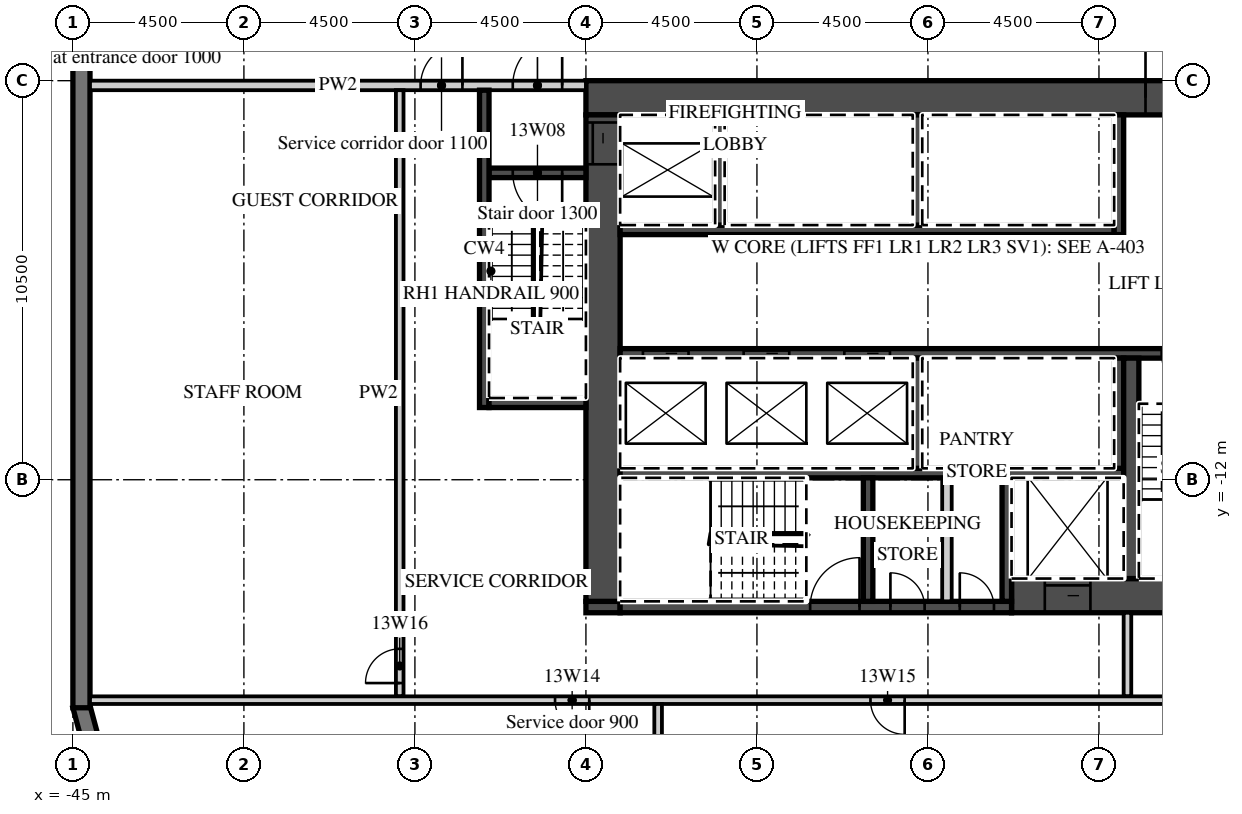
"""IFC4 building model, lengths in metres.
Left out: names, types, materials, properties, quantities, classifications, styles, units other than length and angle.
Written with IfcOpenShell. Run it as: python <this file> out.ifc"""

import sys

from ifc_helpers import new_model, si_unit, direction, frame, frame_2d, origin, place, context, subcontext, project, spatial, polyline, rectangle, outline, extrude, element, fill, save


model = new_model("IFC4")
c1 = context("Model", 3, precision=1e-05, world=origin(), true_north=direction((0.0, 1.0)))
c2 = subcontext(c1, "Body", "Model", "MODEL_VIEW")
j1 = project(units=[si_unit("LENGTHUNIT", "METRE"), si_unit("PLANEANGLEUNIT", "RADIAN")], contexts=[c1])
p1 = place(None, origin())
s1 = spatial("IfcSite", under=j1, at=p1, CompositionType="ELEMENT")
p2 = place(p1, origin())
s2 = spatial("IfcBuilding", under=s1, at=p2, CompositionType="ELEMENT")
p3 = place(p2, frame((0.0, 0.0, 73.2)))
s3 = spatial("IfcBuildingStorey", under=s2, at=p3, CompositionType="ELEMENT", Elevation=73.2)
p4 = place(p3, frame((-44.783, -17.942, 0.0), z_axis=(0.0, 0.0, 1.0), x_axis=(0.25881466832, -0.965926999034, 0.0)))
e1 = element("IfcWall", 1, at=p4, inside=s3, PredefinedType="SOLIDWALL", context=c2, shape_type="SweptSolid", body=[
    extrude(outline(polyline([(0.0, -0.225), (2.071, -0.225), (1.95, 0.225), (0.121, 0.225), (0.0, -0.225)])), origin(), (0.0, 0.0, 1.0), 3.02),
])
p5 = place(p3, frame((-44.775, 18.0, 0.0), z_axis=(0.0, 0.0, 1.0), x_axis=(0.0, -1.0, 0.0)))
e2 = element("IfcWall", 2, at=p5, inside=s3, PredefinedType="SOLIDWALL", context=c2, shape_type="SweptSolid", body=[
    extrude(rectangle(XDim=36.0, YDim=0.45, at=frame_2d((18.0, 0.0))), origin(), (0.0, 0.0, 1.0), 3.02),
])
p6 = place(p5, frame((3.9, 0.0, 0.45)))
e3 = element("IfcOpeningElement", 3, at=p6, cuts=e2, PredefinedType="OPENING", context=c2, shape_type="SweptSolid", body=[
    extrude(rectangle(XDim=3.3, YDim=2.25, at=frame_2d((1.65, 1.125))), frame((0.0, 0.235, 0.0), z_axis=(0.0, -1.0, 0.0), x_axis=(1.0, 0.0, 0.0)), (0.0, 0.0, 1.0), 0.47),
])
p7 = place(p5, frame((8.4, 0.0, 0.45)))
e4 = element("IfcOpeningElement", 4, at=p7, cuts=e2, PredefinedType="OPENING", context=c2, shape_type="SweptSolid", body=[
    extrude(rectangle(XDim=3.3, YDim=2.25, at=frame_2d((1.65, 1.125))), frame((0.0, 0.235, 0.0), z_axis=(0.0, -1.0, 0.0), x_axis=(1.0, 0.0, 0.0)), (0.0, 0.0, 1.0), 0.47),
])
p8 = place(p5, frame((12.9, 0.0, 0.45)))
e5 = element("IfcOpeningElement", 5, at=p8, cuts=e2, PredefinedType="OPENING", context=c2, shape_type="SweptSolid", body=[
    extrude(rectangle(XDim=3.3, YDim=2.25, at=frame_2d((1.65, 1.125))), frame((0.0, 0.235, 0.0), z_axis=(0.0, -1.0, 0.0), x_axis=(1.0, 0.0, 0.0)), (0.0, 0.0, 1.0), 0.47),
])
p9 = place(p3, frame((-31.5, -1.95, 0.0), z_axis=(0.0, 0.0, 1.0), x_axis=(1.0, 0.0, 0.0)))
e6 = element("IfcWall", 6, at=p9, inside=s3, PredefinedType="SHEAR", context=c2, shape_type="SweptSolid", body=[
    extrude(rectangle(XDim=18.0, YDim=0.9, at=frame_2d((9.0, 0.0))), origin(), (0.0, 0.0, 1.0), 3.02),
])
p10 = place(p9, frame((14.725, 0.0, 0.0)))
e7 = element("IfcOpeningElement", 7, at=p10, cuts=e6, PredefinedType="OPENING", context=c2, shape_type="SweptSolid", body=[
    extrude(rectangle(XDim=1.8, YDim=2.1, at=frame_2d((0.9, 1.05))), frame((0.0, 0.46, 0.0), z_axis=(0.0, -1.0, 0.0), x_axis=(1.0, 0.0, 0.0)), (0.0, 0.0, 1.0), 0.92),
])
p11 = place(p3, frame((-20.3, -15.05, 0.0), z_axis=(0.0, 0.0, 1.0), x_axis=(1.0, 0.0, 0.0)))
e8 = element("IfcWall", 8, at=p11, inside=s3, PredefinedType="SHEAR", context=c2, shape_type="SweptSolid", body=[
    extrude(rectangle(XDim=6.8, YDim=0.9, at=frame_2d((3.4, 0.0))), origin(), (0.0, 0.0, 1.0), 3.02),
])
p12 = place(p11, frame((0.875, 0.0, 0.0)))
e9 = element("IfcOpeningElement", 9, at=p12, cuts=e8, PredefinedType="OPENING", context=c2, shape_type="SweptSolid", body=[
    extrude(rectangle(XDim=1.2, YDim=2.1, at=frame_2d((0.6, 1.05))), frame((0.0, 0.46, 0.0), z_axis=(0.0, -1.0, 0.0), x_axis=(1.0, 0.0, 0.0)), (0.0, 0.0, 1.0), 0.92),
])
p13 = place(p3, frame((-31.5, -15.35, 0.0), z_axis=(0.0, 0.0, 1.0), x_axis=(1.0, 0.0, 0.0)))
e10 = element("IfcWall", 10, at=p13, inside=s3, PredefinedType="SHEAR", context=c2, shape_type="SweptSolid", body=[
    extrude(rectangle(XDim=0.9, YDim=0.3, at=frame_2d((0.45, 0.0))), origin(), (0.0, 0.0, 1.0), 3.02),
])
p14 = place(p3, frame((-30.6, -15.35, 0.0), z_axis=(0.0, 0.0, 1.0), x_axis=(1.0, 0.0, 0.0)))
e11 = element("IfcWall", 11, at=p14, inside=s3, PredefinedType="SHEAR", context=c2, shape_type="SweptSolid", body=[
    extrude(rectangle(XDim=10.3, YDim=0.3, at=frame_2d((5.15, 0.0))), origin(), (0.0, 0.0, 1.0), 3.02),
])
p15 = place(p14, frame((5.0, 0.0, 0.0)))
e12 = element("IfcOpeningElement", 12, at=p15, cuts=e11, PredefinedType="OPENING", context=c2, shape_type="SweptSolid", body=[
    extrude(rectangle(XDim=1.3, YDim=2.1, at=frame_2d((0.65, 1.05))), frame((0.0, 0.16, 0.0), z_axis=(0.0, -1.0, 0.0), x_axis=(1.0, 0.0, 0.0)), (0.0, 0.0, 1.0), 0.32),
])
p16 = place(p14, frame((7.113, 0.0, 0.0)))
e13 = element("IfcOpeningElement", 13, at=p16, cuts=e11, PredefinedType="OPENING", context=c2, shape_type="SweptSolid", body=[
    extrude(rectangle(XDim=0.9, YDim=2.1, at=frame_2d((0.45, 1.05))), frame((0.0, 0.16, 0.0), z_axis=(0.0, -1.0, 0.0), x_axis=(1.0, 0.0, 0.0)), (0.0, 0.0, 1.0), 0.32),
])
p17 = place(p14, frame((8.938, 0.0, 0.0)))
e14 = element("IfcOpeningElement", 14, at=p17, cuts=e11, PredefinedType="OPENING", context=c2, shape_type="SweptSolid", body=[
    extrude(rectangle(XDim=0.9, YDim=2.1, at=frame_2d((0.45, 1.05))), frame((0.0, 0.16, 0.0), z_axis=(0.0, -1.0, 0.0), x_axis=(1.0, 0.0, 0.0)), (0.0, 0.0, 1.0), 0.32),
])
p18 = place(p3, frame((-31.05, -15.2, 0.0), z_axis=(0.0, 0.0, 1.0), x_axis=(0.0, 1.0, 0.0)))
e15 = element("IfcWall", 15, at=p18, inside=s3, PredefinedType="SHEAR", context=c2, shape_type="SweptSolid", body=[
    extrude(rectangle(XDim=12.8, YDim=0.9, at=frame_2d((6.4, 0.0))), origin(), (0.0, 0.0, 1.0), 3.02),
])
p19 = place(p18, frame((11.5, 0.0, 0.0)))
e16 = element("IfcOpeningElement", 16, at=p19, cuts=e15, PredefinedType="OPENING", context=c2, shape_type="SweptSolid", body=[
    extrude(rectangle(XDim=1.1, YDim=2.1, at=frame_2d((0.55, 1.05))), frame((0.0, 0.46, 0.0), z_axis=(0.0, -1.0, 0.0), x_axis=(1.0, 0.0, 0.0)), (0.0, 0.0, 1.0), 0.92),
])
p20 = place(p3, frame((-30.6, -5.425, 0.0), z_axis=(0.0, 0.0, 1.0), x_axis=(1.0, 0.0, 0.0)))
e17 = element("IfcWall", 17, at=p20, inside=s3, PredefinedType="SHEAR", context=c2, shape_type="SweptSolid", body=[
    extrude(rectangle(XDim=13.0, YDim=0.25, at=frame_2d((6.5, 0.0))), origin(), (0.0, 0.0, 1.0), 3.02),
])
p21 = place(p3, frame((-17.475, -5.55, 0.0), z_axis=(0.0, 0.0, 1.0), x_axis=(0.0, 1.0, 0.0)))
e18 = element("IfcWall", 18, at=p21, inside=s3, PredefinedType="SHEAR", context=c2, shape_type="SweptSolid", body=[
    extrude(rectangle(XDim=3.15, YDim=0.25, at=frame_2d((1.575, 0.0))), origin(), (0.0, 0.0, 1.0), 3.02),
])
for number, where, z_axis, x_axis in (
    (19, (-27.975, -5.3, 0.0), (0.0, 0.0, 1.0), (0.0, 1.0, 0.0)),
    (20, (-22.775, -5.3, 0.0), (0.0, 0.0, 1.0), (0.0, 1.0, 0.0)),
):
    element("IfcWall", number, at=place(p3, frame(where, z_axis=z_axis, x_axis=x_axis)), inside=s3, PredefinedType="SHEAR", context=c2, shape_type="SweptSolid", body=[
        extrude(rectangle(XDim=2.9, YDim=0.25, at=frame_2d((1.45, 0.0))), origin(), (0.0, 0.0, 1.0), 3.02),
    ])
p22 = place(p3, frame((-30.6, -8.675, 0.0), z_axis=(0.0, 0.0, 1.0), x_axis=(1.0, 0.0, 0.0)))
e21 = element("IfcWall", 21, at=p22, inside=s3, PredefinedType="SHEAR", context=c2, shape_type="SweptSolid", body=[
    extrude(rectangle(XDim=16.2, YDim=0.25, at=frame_2d((8.1, 0.0))), origin(), (0.0, 0.0, 1.0), 3.02),
])
p23 = place(p22, frame((0.6, 0.0, 0.0)))
e22 = element("IfcOpeningElement", 22, at=p23, cuts=e21, PredefinedType="OPENING", context=c2, shape_type="SweptSolid", body=[
    extrude(rectangle(XDim=1.2, YDim=2.1, at=frame_2d((0.6, 1.05))), frame((0.0, 0.135, 0.0), z_axis=(0.0, -1.0, 0.0), x_axis=(1.0, 0.0, 0.0)), (0.0, 0.0, 1.0), 0.27),
])
p24 = place(p22, frame((3.25, 0.0, 0.0)))
e23 = element("IfcOpeningElement", 23, at=p24, cuts=e21, PredefinedType="OPENING", context=c2, shape_type="SweptSolid", body=[
    extrude(rectangle(XDim=1.2, YDim=2.1, at=frame_2d((0.6, 1.05))), frame((0.0, 0.135, 0.0), z_axis=(0.0, -1.0, 0.0), x_axis=(1.0, 0.0, 0.0)), (0.0, 0.0, 1.0), 0.27),
])
p25 = place(p22, frame((5.9, 0.0, 0.0)))
e24 = element("IfcOpeningElement", 24, at=p25, cuts=e21, PredefinedType="OPENING", context=c2, shape_type="SweptSolid", body=[
    extrude(rectangle(XDim=1.2, YDim=2.1, at=frame_2d((0.6, 1.05))), frame((0.0, 0.135, 0.0), z_axis=(0.0, -1.0, 0.0), x_axis=(1.0, 0.0, 0.0)), (0.0, 0.0, 1.0), 0.27),
])
p26 = place(p22, frame((14.25, 0.0, 0.0)))
e25 = element("IfcOpeningElement", 25, at=p26, cuts=e21, PredefinedType="OPENING", context=c2, shape_type="SweptSolid", body=[
    extrude(rectangle(XDim=1.3, YDim=2.1, at=frame_2d((0.65, 1.05))), frame((0.0, 0.135, 0.0), z_axis=(0.0, -1.0, 0.0), x_axis=(1.0, 0.0, 0.0)), (0.0, 0.0, 1.0), 0.27),
])
p27 = place(p3, frame((-30.6, -11.825, 0.0), z_axis=(0.0, 0.0, 1.0), x_axis=(1.0, 0.0, 0.0)))
e26 = element("IfcWall", 26, at=p27, inside=s3, PredefinedType="SHEAR", context=c2, shape_type="SweptSolid", body=[
    extrude(rectangle(XDim=13.25, YDim=0.25, at=frame_2d((6.625, 0.0))), origin(), (0.0, 0.0, 1.0), 3.02),
])
for number, where, z_axis, x_axis in (
    (27, (-17.475, -11.7, 0.0), (0.0, 0.0, 1.0), (0.0, 1.0, 0.0)),
    (28, (-22.775, -11.7, 0.0), (0.0, 0.0, 1.0), (0.0, 1.0, 0.0)),
):
    element("IfcWall", number, at=place(p3, frame(where, z_axis=z_axis, x_axis=x_axis)), inside=s3, PredefinedType="SHEAR", context=c2, shape_type="SweptSolid", body=[
        extrude(rectangle(XDim=2.9, YDim=0.25, at=frame_2d((1.45, 0.0))), origin(), (0.0, 0.0, 1.0), 3.02),
    ])
p28 = place(p3, frame((-17.15, -14.6, 0.0), z_axis=(0.0, 0.0, 1.0), x_axis=(0.0, 1.0, 0.0)))
e29 = element("IfcWall", 29, at=p28, inside=s3, PredefinedType="SHEAR", context=c2, shape_type="SweptSolid", body=[
    extrude(rectangle(XDim=5.8, YDim=0.4, at=frame_2d((2.9, 0.0))), origin(), (0.0, 0.0, 1.0), 3.02),
])
for number, where, z_axis, x_axis in (
    (30, (-20.425, -15.2, 0.0), (0.0, 0.0, 1.0), (0.0, 1.0, 0.0)),
    (31, (-24.075, -15.2, 0.0), (0.0, 0.0, 1.0), (0.0, 1.0, 0.0)),
):
    element("IfcWall", number, at=place(p3, frame(where, z_axis=z_axis, x_axis=x_axis)), inside=s3, PredefinedType="SHEAR", context=c2, shape_type="SweptSolid", body=[
        extrude(rectangle(XDim=3.25, YDim=0.25, at=frame_2d((1.625, 0.0))), origin(), (0.0, 0.0, 1.0), 3.02),
    ])
p29 = place(p3, frame((-22.0, -15.2, 0.0), z_axis=(0.0, 0.0, 1.0), x_axis=(0.0, 1.0, 0.0)))
e32 = element("IfcWall", 32, at=p29, inside=s3, PredefinedType="PARTITIONING", context=c2, shape_type="SweptSolid", body=[
    extrude(rectangle(XDim=3.25, YDim=0.25, at=frame_2d((1.625, 0.0))), origin(), (0.0, 0.0, 1.0), 3.02),
])
p30 = place(p3, frame((-44.55, -1.625, 0.0), z_axis=(0.0, 0.0, 1.0), x_axis=(1.0, 0.0, 0.0)))
e33 = element("IfcWall", 33, at=p30, inside=s3, PredefinedType="PARTITIONING", context=c2, shape_type="SweptSolid", body=[
    extrude(rectangle(XDim=13.05, YDim=0.25, at=frame_2d((6.525, 0.0))), origin(), (0.0, 0.0, 1.0), 3.02),
])
p31 = place(p30, frame((11.125, 0.0, 0.0)))
e34 = element("IfcOpeningElement", 34, at=p31, cuts=e33, PredefinedType="OPENING", context=c2, shape_type="SweptSolid", body=[
    extrude(rectangle(XDim=1.3, YDim=2.1, at=frame_2d((0.65, 1.05))), frame((0.0, 0.135, 0.0), z_axis=(0.0, -1.0, 0.0), x_axis=(1.0, 0.0, 0.0)), (0.0, 0.0, 1.0), 0.27),
])
p32 = place(p30, frame((8.7, 0.0, 0.0)))
e35 = element("IfcOpeningElement", 35, at=p32, cuts=e33, PredefinedType="OPENING", context=c2, shape_type="SweptSolid", body=[
    extrude(rectangle(XDim=1.1, YDim=2.1, at=frame_2d((0.55, 1.05))), frame((0.0, 0.135, 0.0), z_axis=(0.0, -1.0, 0.0), x_axis=(1.0, 0.0, 0.0)), (0.0, 0.0, 1.0), 0.27),
])
p33 = place(p3, frame((-34.05, -3.925, 0.0), z_axis=(0.0, 0.0, 1.0), x_axis=(1.0, 0.0, 0.0)))
e36 = element("IfcWall", 36, at=p33, inside=s3, PredefinedType="SHEAR", context=c2, shape_type="SweptSolid", body=[
    extrude(rectangle(XDim=2.55, YDim=0.25, at=frame_2d((1.275, 0.0))), origin(), (0.0, 0.0, 1.0), 3.02),
])
p34 = place(p33, frame((0.625, 0.0, 0.0)))
e37 = element("IfcOpeningElement", 37, at=p34, cuts=e36, PredefinedType="OPENING", context=c2, shape_type="SweptSolid", body=[
    extrude(rectangle(XDim=1.3, YDim=2.1, at=frame_2d((0.65, 1.05))), frame((0.0, 0.135, 0.0), z_axis=(0.0, -1.0, 0.0), x_axis=(1.0, 0.0, 0.0)), (0.0, 0.0, 1.0), 0.27),
])
p35 = place(p3, frame((-34.175, -10.1, 0.0), z_axis=(0.0, 0.0, 1.0), x_axis=(0.0, 1.0, 0.0)))
e38 = element("IfcWall", 38, at=p35, inside=s3, PredefinedType="SHEAR", context=c2, shape_type="SweptSolid", body=[
    extrude(rectangle(XDim=8.35, YDim=0.25, at=frame_2d((4.175, 0.0))), origin(), (0.0, 0.0, 1.0), 3.02),
])
p36 = place(p3, frame((-34.05, -9.975, 0.0), z_axis=(0.0, 0.0, 1.0), x_axis=(1.0, 0.0, 0.0)))
e39 = element("IfcWall", 39, at=p36, inside=s3, PredefinedType="SHEAR", context=c2, shape_type="SweptSolid", body=[
    extrude(rectangle(XDim=2.55, YDim=0.25, at=frame_2d((1.275, 0.0))), origin(), (0.0, 0.0, 1.0), 3.02),
])
p37 = place(p3, frame((-17.25, -17.7, 0.0), z_axis=(0.0, 0.0, 1.0), x_axis=(0.0, 1.0, 0.0)))
e40 = element("IfcWall", 40, at=p37, inside=s3, PredefinedType="PARTITIONING", context=c2, shape_type="SweptSolid", body=[
    extrude(rectangle(XDim=2.2, YDim=0.2, at=frame_2d((1.1, 0.0))), origin(), (0.0, 0.0, 1.0), 3.02),
])
p38 = place(p3, frame((-36.4, -17.7, 0.0), z_axis=(0.0, 0.0, 1.0), x_axis=(0.0, 1.0, 0.0)))
e41 = element("IfcWall", 41, at=p38, inside=s3, PredefinedType="PARTITIONING", context=c2, shape_type="SweptSolid", body=[
    extrude(rectangle(XDim=15.95, YDim=0.2, at=frame_2d((7.975, 0.0))), origin(), (0.0, 0.0, 1.0), 3.02),
])
p39 = place(p38, frame((0.35, 0.0, 0.0)))
e42 = element("IfcOpeningElement", 42, at=p39, cuts=e41, PredefinedType="OPENING", context=c2, shape_type="SweptSolid", body=[
    extrude(rectangle(XDim=0.9, YDim=2.1, at=frame_2d((0.45, 1.05))), frame((0.0, 0.11, 0.0), z_axis=(0.0, -1.0, 0.0), x_axis=(1.0, 0.0, 0.0)), (0.0, 0.0, 1.0), 0.22),
])
p40 = place(p3, frame((-44.55, -17.8, 0.0), z_axis=(0.0, 0.0, 1.0), x_axis=(1.0, 0.0, 0.0)))
e43 = element("IfcWall", 43, at=p40, inside=s3, PredefinedType="PARTITIONING", context=c2, shape_type="SweptSolid", body=[
    extrude(rectangle(XDim=30.95, YDim=0.2, at=frame_2d((15.475, 0.0))), origin(), (0.0, 0.0, 1.0), 3.02),
])
p41 = place(p40, frame((12.238, 0.0, 0.0)))
e44 = element("IfcOpeningElement", 44, at=p41, cuts=e43, PredefinedType="OPENING", context=c2, shape_type="SweptSolid", body=[
    extrude(rectangle(XDim=0.9, YDim=2.1, at=frame_2d((0.45, 1.05))), frame((0.0, 0.11, 0.0), z_axis=(0.0, -1.0, 0.0), x_axis=(1.0, 0.0, 0.0)), (0.0, 0.0, 1.0), 0.22),
])
p42 = place(p40, frame((20.538, 0.0, 0.0)))
e45 = element("IfcOpeningElement", 45, at=p42, cuts=e43, PredefinedType="OPENING", context=c2, shape_type="SweptSolid", body=[
    extrude(rectangle(XDim=0.9, YDim=2.1, at=frame_2d((0.45, 1.05))), frame((0.0, 0.11, 0.0), z_axis=(0.0, -1.0, 0.0), x_axis=(1.0, 0.0, 0.0)), (0.0, 0.0, 1.0), 0.22),
])
p43 = place(p3, frame((-29.6, -21.55, 0.0), z_axis=(0.0, 0.0, 1.0), x_axis=(0.0, 1.0, 0.0)))
e46 = element("IfcWall", 46, at=p43, inside=s3, PredefinedType="PARTITIONING", context=c2, shape_type="SweptSolid", body=[
    extrude(rectangle(XDim=3.65, YDim=0.2, at=frame_2d((1.825, 0.0))), origin(), (0.0, 0.0, 1.0), 3.02),
])
p44 = place(p23, origin())
e47 = element("IfcDoor", 47, at=p44, inside=s3, OperationType="SLIDING_TO_LEFT", PredefinedType="DOOR", context=c2, shape_type="SweptSolid", body=[
    extrude(rectangle(XDim=1.2, YDim=2.1, at=frame_2d((0.6, 1.05))), frame((0.0, 0.025, 0.0), z_axis=(0.0, -1.0, 0.0), x_axis=(1.0, 0.0, 0.0)), (0.0, 0.0, 1.0), 0.05),
])
fill(e22, e47)
p45 = place(p24, origin())
e48 = element("IfcDoor", 48, at=p45, inside=s3, OperationType="SLIDING_TO_RIGHT", PredefinedType="DOOR", context=c2, shape_type="SweptSolid", body=[
    extrude(rectangle(XDim=1.2, YDim=2.1, at=frame_2d((0.6, 1.05))), frame((0.0, 0.025, 0.0), z_axis=(0.0, -1.0, 0.0), x_axis=(1.0, 0.0, 0.0)), (0.0, 0.0, 1.0), 0.05),
])
fill(e23, e48)
p46 = place(p25, origin())
e49 = element("IfcDoor", 49, at=p46, inside=s3, OperationType="SLIDING_TO_RIGHT", PredefinedType="DOOR", context=c2, shape_type="SweptSolid", body=[
    extrude(rectangle(XDim=1.2, YDim=2.1, at=frame_2d((0.6, 1.05))), frame((0.0, 0.025, 0.0), z_axis=(0.0, -1.0, 0.0), x_axis=(1.0, 0.0, 0.0)), (0.0, 0.0, 1.0), 0.05),
])
fill(e24, e49)
p47 = place(p12, origin())
e50 = element("IfcDoor", 50, at=p47, inside=s3, OperationType="SLIDING_TO_LEFT", PredefinedType="DOOR", context=c2, shape_type="SweptSolid", body=[
    extrude(rectangle(XDim=1.2, YDim=2.1, at=frame_2d((0.6, 1.05))), frame((0.0, 0.025, 0.0), z_axis=(0.0, -1.0, 0.0), x_axis=(1.0, 0.0, 0.0)), (0.0, 0.0, 1.0), 0.05),
])
fill(e9, e50)
p48 = place(p19, origin())
e51 = element("IfcDoor", 51, at=p48, inside=s3, OperationType="SLIDING_TO_RIGHT", PredefinedType="DOOR", context=c2, shape_type="SweptSolid", body=[
    extrude(rectangle(XDim=1.1, YDim=2.1, at=frame_2d((0.55, 1.05))), frame((0.0, 0.025, 0.0), z_axis=(0.0, -1.0, 0.0), x_axis=(1.0, 0.0, 0.0)), (0.0, 0.0, 1.0), 0.05),
])
fill(e16, e51)
p49 = place(p10, origin())
e52 = element("IfcDoor", 52, at=p49, inside=s3, OperationType="DOUBLE_DOOR_DOUBLE_SWING", PredefinedType="DOOR", context=c2, shape_type="SweptSolid", body=[
    extrude(rectangle(XDim=1.8, YDim=2.1, at=frame_2d((0.9, 1.05))), frame((0.0, 0.025, 0.0), z_axis=(0.0, -1.0, 0.0), x_axis=(1.0, 0.0, 0.0)), (0.0, 0.0, 1.0), 0.05),
])
fill(e7, e52)
p50 = place(p31, origin())
e53 = element("IfcDoor", 53, at=p50, inside=s3, OperationType="SINGLE_SWING_RIGHT", PredefinedType="DOOR", context=c2, shape_type="SweptSolid", body=[
    extrude(rectangle(XDim=1.3, YDim=2.1, at=frame_2d((0.65, 1.05))), frame((0.0, 0.025, 0.0), z_axis=(0.0, -1.0, 0.0), x_axis=(1.0, 0.0, 0.0)), (0.0, 0.0, 1.0), 0.05),
])
fill(e34, e53)
p51 = place(p34, origin())
e54 = element("IfcDoor", 54, at=p51, inside=s3, OperationType="SINGLE_SWING_RIGHT", PredefinedType="DOOR", context=c2, shape_type="SweptSolid", body=[
    extrude(rectangle(XDim=1.3, YDim=2.1, at=frame_2d((0.65, 1.05))), frame((0.0, 0.025, 0.0), z_axis=(0.0, -1.0, 0.0), x_axis=(1.0, 0.0, 0.0)), (0.0, 0.0, 1.0), 0.05),
])
fill(e37, e54)
p52 = place(p32, origin())
e55 = element("IfcDoor", 55, at=p52, inside=s3, OperationType="SINGLE_SWING_RIGHT", PredefinedType="DOOR", context=c2, shape_type="SweptSolid", body=[
    extrude(rectangle(XDim=1.1, YDim=2.1, at=frame_2d((0.55, 1.05))), frame((0.0, 0.025, 0.0), z_axis=(0.0, -1.0, 0.0), x_axis=(1.0, 0.0, 0.0)), (0.0, 0.0, 1.0), 0.05),
])
fill(e35, e55)
p53 = place(p26, origin())
e56 = element("IfcDoor", 56, at=p53, inside=s3, OperationType="SINGLE_SWING_RIGHT", PredefinedType="DOOR", context=c2, shape_type="SweptSolid", body=[
    extrude(rectangle(XDim=1.3, YDim=2.1, at=frame_2d((0.65, 1.05))), frame((0.0, 0.025, 0.0), z_axis=(0.0, -1.0, 0.0), x_axis=(1.0, 0.0, 0.0)), (0.0, 0.0, 1.0), 0.05),
])
fill(e25, e56)
p54 = place(p15, origin())
e57 = element("IfcDoor", 57, at=p54, inside=s3, OperationType="SINGLE_SWING_RIGHT", PredefinedType="DOOR", context=c2, shape_type="SweptSolid", body=[
    extrude(rectangle(XDim=1.3, YDim=2.1, at=frame_2d((0.65, 1.05))), frame((0.0, 0.025, 0.0), z_axis=(0.0, -1.0, 0.0), x_axis=(1.0, 0.0, 0.0)), (0.0, 0.0, 1.0), 0.05),
])
fill(e12, e57)
p55 = place(p16, origin())
e58 = element("IfcDoor", 58, at=p55, inside=s3, OperationType="SINGLE_SWING_LEFT", PredefinedType="DOOR", context=c2, shape_type="SweptSolid", body=[
    extrude(rectangle(XDim=0.9, YDim=2.1, at=frame_2d((0.45, 1.05))), frame((0.0, 0.025, 0.0), z_axis=(0.0, -1.0, 0.0), x_axis=(1.0, 0.0, 0.0)), (0.0, 0.0, 1.0), 0.05),
])
fill(e13, e58)
p56 = place(p17, origin())
e59 = element("IfcDoor", 59, at=p56, inside=s3, OperationType="SINGLE_SWING_LEFT", PredefinedType="DOOR", context=c2, shape_type="SweptSolid", body=[
    extrude(rectangle(XDim=0.9, YDim=2.1, at=frame_2d((0.45, 1.05))), frame((0.0, 0.025, 0.0), z_axis=(0.0, -1.0, 0.0), x_axis=(1.0, 0.0, 0.0)), (0.0, 0.0, 1.0), 0.05),
])
fill(e14, e59)
p57 = place(p41, origin())
e60 = element("IfcDoor", 60, at=p57, inside=s3, OperationType="SINGLE_SWING_RIGHT", PredefinedType="DOOR", context=c2, shape_type="SweptSolid", body=[
    extrude(rectangle(XDim=0.9, YDim=2.1, at=frame_2d((0.45, 1.05))), frame((0.0, 0.025, 0.0), z_axis=(0.0, -1.0, 0.0), x_axis=(1.0, 0.0, 0.0)), (0.0, 0.0, 1.0), 0.05),
])
fill(e44, e60)
p58 = place(p42, origin())
e61 = element("IfcDoor", 61, at=p58, inside=s3, OperationType="SINGLE_SWING_RIGHT", PredefinedType="DOOR", context=c2, shape_type="SweptSolid", body=[
    extrude(rectangle(XDim=0.9, YDim=2.1, at=frame_2d((0.45, 1.05))), frame((0.0, 0.025, 0.0), z_axis=(0.0, -1.0, 0.0), x_axis=(1.0, 0.0, 0.0)), (0.0, 0.0, 1.0), 0.05),
])
fill(e45, e61)
p59 = place(p39, origin())
e62 = element("IfcDoor", 62, at=p59, inside=s3, OperationType="SINGLE_SWING_LEFT", PredefinedType="DOOR", context=c2, shape_type="SweptSolid", body=[
    extrude(rectangle(XDim=0.9, YDim=2.1, at=frame_2d((0.45, 1.05))), frame((0.0, 0.025, 0.0), z_axis=(0.0, -1.0, 0.0), x_axis=(1.0, 0.0, 0.0)), (0.0, 0.0, 1.0), 0.05),
])
fill(e42, e62)
save(model, sys.argv[1])
